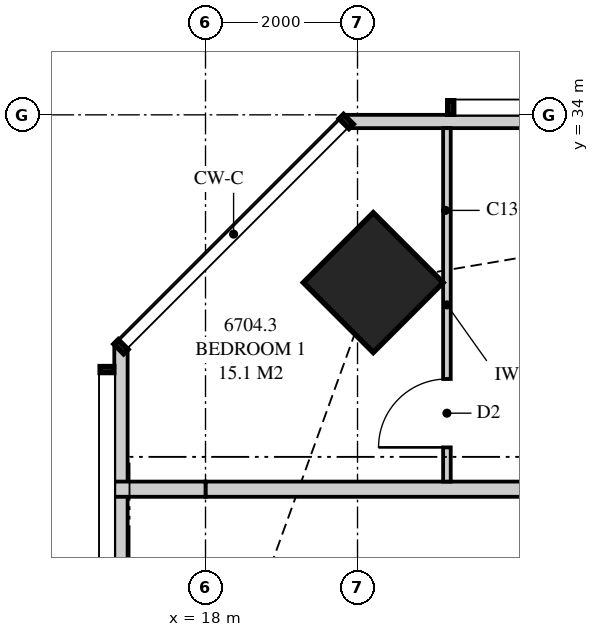
"""IFC4 building model, lengths in metres.
Left out: names, types, materials, properties, quantities, classifications, styles, units other than length and angle.
Written with IfcOpenShell. Run it as: python <this file> out.ifc"""

import sys

from ifc_helpers import new_model, si_unit, direction, frame, frame_2d, origin, origin_2d, place, context, subcontext, project, spatial, polyline, rectangle, outline, extrude, element, fill, save


model = new_model("IFC4")
c1 = context("Model", 3, precision=1e-05, world=origin(), true_north=direction((0.0, 1.0)))
c2 = subcontext(c1, "Body", "Model", "MODEL_VIEW")
j1 = project(units=[si_unit("LENGTHUNIT", "METRE"), si_unit("PLANEANGLEUNIT", "RADIAN")], contexts=[c1])
p1 = place(None, origin())
s1 = spatial("IfcSite", under=j1, at=p1, CompositionType="ELEMENT")
p2 = place(p1, origin())
s2 = spatial("IfcBuilding", under=s1, at=p2, CompositionType="ELEMENT")
p3 = place(p2, frame((0.0, 0.0, 245.95)))
s3 = spatial("IfcBuildingStorey", under=s2, at=p3, CompositionType="ELEMENT", Elevation=245.95)
p4 = place(p3, frame((20.207, 31.793, 0.0), z_axis=(0.0, 0.0, 1.0), x_axis=(0.707106781187, 0.707106781187, 0.0)))
e1 = element("IfcColumn", 1, at=p4, inside=s3, PredefinedType="COLUMN", context=c2, shape_type="SweptSolid", body=[
    extrude(rectangle(XDim=1.3, YDim=1.3, at=origin_2d()), origin(), (0.0, 0.0, 1.0), 3.5),
])
p5 = place(p3, frame((53.449, 33.913, 0.0), z_axis=(0.0, 0.0, 1.0), x_axis=(-1.0, 0.0, 0.0)))
e2 = element("IfcWall", 2, at=p5, inside=s3, PredefinedType="SOLIDWALL", context=c2, shape_type="SweptSolid", body=[
    extrude(outline(polyline([(0.0, 0.0), (33.597, 0.0), (33.597, 3.26), (26.039, 3.26), (26.039, 2.3), (25.955, 2.3), (25.955, 3.26), (25.824, 3.26), (25.824, 2.3), (6.574, 2.3), (6.574, 3.26), (6.442, 3.26), (6.442, 2.3), (6.359, 2.3), (6.359, 3.26), (0.0, 3.26), (0.0, 0.0)])), frame((0.0, 0.087, 0.0), z_axis=(0.0, -1.0, 0.0), x_axis=(1.0, 0.0, 0.0)), (0.0, 0.0, 1.0), 0.175),
])
p6 = place(p5, frame((0.6, 0.0, 0.0)))
e3 = element("IfcOpeningElement", 3, at=p6, cuts=e2, PredefinedType="OPENING", context=c2, shape_type="SweptSolid", body=[
    extrude(rectangle(XDim=1.8, YDim=2.25, at=frame_2d((0.9, 1.125))), frame((0.0, 0.097, 0.0), z_axis=(0.0, -1.0, 0.0), x_axis=(1.0, 0.0, 0.0)), (0.0, 0.0, 1.0), 0.195),
])
p7 = place(p5, frame((9.76, 0.0, 0.4)))
e4 = element("IfcOpeningElement", 4, at=p7, cuts=e2, PredefinedType="OPENING", context=c2, shape_type="SweptSolid", body=[
    extrude(rectangle(XDim=2.4, YDim=1.85, at=frame_2d((1.2, 0.925))), frame((0.0, 0.097, 0.0), z_axis=(0.0, -1.0, 0.0), x_axis=(1.0, 0.0, 0.0)), (0.0, 0.0, 1.0), 0.195),
])
p8 = place(p5, frame((19.974, 0.0, 0.4)))
e5 = element("IfcOpeningElement", 5, at=p8, cuts=e2, PredefinedType="OPENING", context=c2, shape_type="SweptSolid", body=[
    extrude(rectangle(XDim=1.8, YDim=1.85, at=frame_2d((0.9, 0.925))), frame((0.0, 0.097, 0.0), z_axis=(0.0, -1.0, 0.0), x_axis=(1.0, 0.0, 0.0)), (0.0, 0.0, 1.0), 0.195),
])
p9 = place(p5, frame((23.144, 0.0, 0.4)))
e6 = element("IfcOpeningElement", 6, at=p9, cuts=e2, PredefinedType="OPENING", context=c2, shape_type="SweptSolid", body=[
    extrude(rectangle(XDim=1.8, YDim=1.85, at=frame_2d((0.9, 0.925))), frame((0.0, 0.097, 0.0), z_axis=(0.0, -1.0, 0.0), x_axis=(1.0, 0.0, 0.0)), (0.0, 0.0, 1.0), 0.195),
])
p10 = place(p5, frame((29.273, 0.0, 0.4)))
e7 = element("IfcOpeningElement", 7, at=p10, cuts=e2, PredefinedType="OPENING", context=c2, shape_type="SweptSolid", body=[
    extrude(rectangle(XDim=1.8, YDim=1.85, at=frame_2d((0.9, 0.925))), frame((0.0, 0.097, 0.0), z_axis=(0.0, -1.0, 0.0), x_axis=(1.0, 0.0, 0.0)), (0.0, 0.0, 1.0), 0.195),
])
p11 = place(p3, frame((16.887, 30.949, 0.0), z_axis=(0.0, 0.0, 1.0), x_axis=(0.0, -1.0, 0.0)))
e8 = element("IfcWall", 8, at=p11, inside=s3, PredefinedType="SOLIDWALL", context=c2, shape_type="SweptSolid", body=[
    extrude(outline(polyline([(0.0, 0.0), (27.897, 0.0), (27.897, 3.26), (18.148, 3.26), (18.148, 2.3), (18.125, 2.3), (18.125, 3.26), (17.949, 3.26), (17.949, 2.3), (5.949, 2.3), (5.949, 3.26), (0.0, 3.26), (0.0, 0.0)])), frame((0.0, 0.087, 0.0), z_axis=(0.0, -1.0, 0.0), x_axis=(1.0, 0.0, 0.0)), (0.0, 0.0, 1.0), 0.175),
])
p12 = place(p11, frame((11.849, 0.0, 0.4)))
e9 = element("IfcOpeningElement", 9, at=p12, cuts=e8, PredefinedType="OPENING", context=c2, shape_type="SweptSolid", body=[
    extrude(rectangle(XDim=1.2, YDim=1.85, at=frame_2d((0.6, 0.925))), frame((0.0, 0.097, 0.0), z_axis=(0.0, -1.0, 0.0), x_axis=(1.0, 0.0, 0.0)), (0.0, 0.0, 1.0), 0.195),
])
p13 = place(p11, frame((24.311, 0.0, 0.4)))
e10 = element("IfcOpeningElement", 10, at=p13, cuts=e8, PredefinedType="OPENING", context=c2, shape_type="SweptSolid", body=[
    extrude(rectangle(XDim=2.4, YDim=1.85, at=frame_2d((1.2, 0.925))), frame((0.0, 0.097, 0.0), z_axis=(0.0, -1.0, 0.0), x_axis=(1.0, 0.0, 0.0)), (0.0, 0.0, 1.0), 0.195),
])
p14 = place(p3, frame((18.0, 29.075, 0.0), z_axis=(0.0, 0.0, 1.0), x_axis=(1.0, 0.0, 0.0)))
e11 = element("IfcWall", 11, at=p14, inside=s3, PredefinedType="PARTITIONING", context=c2, shape_type="SweptSolid", body=[
    extrude(outline(polyline([(0.0, 0.0), (27.875, 0.0), (27.875, 3.26), (27.875, 2.66), (27.565, 2.66), (27.565, 3.26), (20.56, 3.26), (20.56, 2.66), (17.94, 2.66), (17.94, 3.26), (10.935, 3.26), (10.935, 2.66), (8.315, 2.66), (8.315, 3.26), (2.192, 3.26), (2.192, 2.3), (0.256, 2.3), (0.256, 3.26), (0.0, 3.26), (0.0, 0.0)])), frame((0.0, 0.1, 0.0), z_axis=(0.0, -1.0, 0.0), x_axis=(1.0, 0.0, 0.0)), (0.0, 0.0, 1.0), 0.2),
])
p15 = place(p14, frame((18.75, 0.0, 0.0)))
e12 = element("IfcOpeningElement", 12, at=p15, cuts=e11, PredefinedType="OPENING", context=c2, shape_type="SweptSolid", body=[
    extrude(rectangle(XDim=1.05, YDim=2.2, at=frame_2d((0.525, 1.1))), frame((0.0, 0.11, 0.0), z_axis=(0.0, -1.0, 0.0), x_axis=(1.0, 0.0, 0.0)), (0.0, 0.0, 1.0), 0.22),
])
p16 = place(p3, frame((21.176, 33.825, 0.0), z_axis=(0.0, 0.0, 1.0), x_axis=(0.0, -1.0, 0.0)))
e13 = element("IfcWall", 13, at=p16, inside=s3, PredefinedType="PARTITIONING", context=c2, shape_type="SweptSolid", body=[
    extrude(outline(polyline([(0.0, 0.0), (4.65, 0.0), (4.65, 3.26), (2.74, 3.26), (2.74, 2.3), (0.996, 2.3), (0.996, 3.26), (0.0, 3.26), (0.0, 0.0)])), frame((0.0, 0.05, 0.0), z_axis=(0.0, -1.0, 0.0), x_axis=(1.0, 0.0, 0.0)), (0.0, 0.0, 1.0), 0.1),
])
p17 = place(p16, frame((3.3, 0.0, 0.0)))
e14 = element("IfcOpeningElement", 14, at=p17, cuts=e13, PredefinedType="OPENING", context=c2, shape_type="SweptSolid", body=[
    extrude(rectangle(XDim=0.9, YDim=2.1, at=frame_2d((0.45, 1.05))), frame((0.0, 0.06, 0.0), z_axis=(0.0, -1.0, 0.0), x_axis=(1.0, 0.0, 0.0)), (0.0, 0.0, 1.0), 0.12),
])
p18 = place(p3, frame((16.8, 29.075, 0.0), z_axis=(0.0, 0.0, 1.0), x_axis=(1.0, 0.0, 0.0)))
e15 = element("IfcWall", 15, at=p18, inside=s3, PredefinedType="PARTITIONING", context=c2, shape_type="SweptSolid", body=[
    extrude(rectangle(XDim=1.2, YDim=0.2, at=frame_2d((0.6, 0.0))), origin(), (0.0, 0.0, 1.0), 3.26),
])
p19 = place(p17, frame((0.9, 0.0, 0.0), z_axis=(0.0, 0.0, 1.0), x_axis=(-1.0, 0.0, 0.0)))
e16 = element("IfcDoor", 16, at=p19, inside=s3, OperationType="SINGLE_SWING_LEFT", PredefinedType="DOOR", context=c2, shape_type="SweptSolid", body=[
    extrude(rectangle(XDim=0.9, YDim=2.1, at=frame_2d((0.45, 1.05))), frame((0.0, 0.025, 0.0), z_axis=(0.0, -1.0, 0.0), x_axis=(1.0, 0.0, 0.0)), (0.0, 0.0, 1.0), 0.05),
])
fill(e14, e16)
save(model, sys.argv[1])
